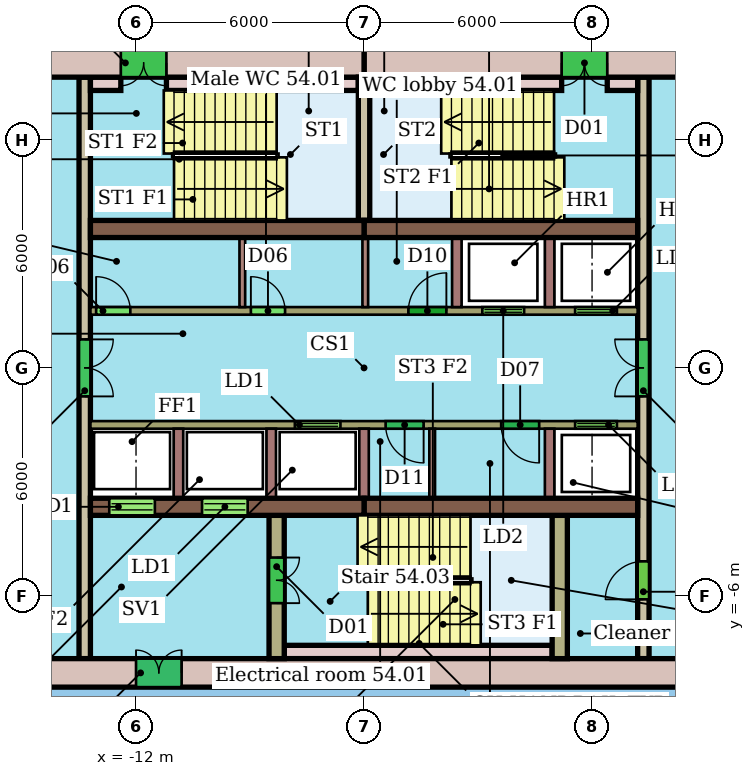
"""IFC4 building model, lengths in metres.
Left out: names, types, materials, properties, quantities, classifications, styles, units other than length and angle.
Written with IfcOpenShell. Run it as: python <this file> out.ifc"""

import sys

from ifc_helpers import new_model, si_unit, direction, frame, frame_2d, origin, place, context, subcontext, project, spatial, rectangle, extrude, element, fill, save


model = new_model("IFC4")
c1 = context("Model", 3, precision=1e-05, world=origin(), true_north=direction((0.0, 1.0)))
c2 = subcontext(c1, "Body", "Model", "MODEL_VIEW")
j1 = project(units=[si_unit("LENGTHUNIT", "METRE"), si_unit("PLANEANGLEUNIT", "RADIAN")], contexts=[c1])
p1 = place(None, origin())
s1 = spatial("IfcSite", under=j1, at=p1, CompositionType="ELEMENT")
p2 = place(p1, origin())
s2 = spatial("IfcBuilding", under=s1, at=p2, CompositionType="ELEMENT")
p3 = place(p2, frame((0.0, 0.0, 220.9)))
s3 = spatial("IfcBuildingStorey", under=s2, at=p3, CompositionType="ELEMENT", Elevation=220.9)
p4 = place(p3, frame((4.8, 8.025, 0.0), z_axis=(0.0, 0.0, 1.0), x_axis=(-1.0, 0.0, 0.0)))
e1 = element("IfcWall", 1, at=p4, inside=s3, PredefinedType="SHEAR", context=c2, shape_type="SweptSolid", body=[
    extrude(rectangle(XDim=10.8, YDim=0.75, at=frame_2d((5.4, 0.0))), origin(), (0.0, 0.0, 1.0), 3.3),
])
p5 = place(p4, frame((4.4, 0.0, 0.0)))
e2 = element("IfcOpeningElement", 2, at=p5, cuts=e1, PredefinedType="OPENING", context=c2, shape_type="SweptSolid", body=[
    extrude(rectangle(XDim=1.2, YDim=2.1, at=frame_2d((0.6, 1.05))), frame((0.0, 0.385, 0.0), z_axis=(0.0, -1.0, 0.0), x_axis=(1.0, 0.0, 0.0)), (0.0, 0.0, 1.0), 0.77),
])
p6 = place(p3, frame((-6.0, 8.025, 0.0), z_axis=(0.0, 0.0, 1.0), x_axis=(-1.0, 0.0, 0.0)))
e3 = element("IfcWall", 3, at=p6, inside=s3, PredefinedType="SHEAR", context=c2, shape_type="SweptSolid", body=[
    extrude(rectangle(XDim=10.8, YDim=0.75, at=frame_2d((5.4, 0.0))), origin(), (0.0, 0.0, 1.0), 3.3),
])
p7 = place(p6, frame((5.2, 0.0, 0.0)))
e4 = element("IfcOpeningElement", 4, at=p7, cuts=e3, PredefinedType="OPENING", context=c2, shape_type="SweptSolid", body=[
    extrude(rectangle(XDim=1.2, YDim=2.1, at=frame_2d((0.6, 1.05))), frame((0.0, 0.385, 0.0), z_axis=(0.0, -1.0, 0.0), x_axis=(1.0, 0.0, 0.0)), (0.0, 0.0, 1.0), 0.77),
])
p8 = place(p3, frame((-16.8, -8.025, 0.0), z_axis=(0.0, 0.0, 1.0), x_axis=(1.0, 0.0, 0.0)))
e5 = element("IfcWall", 5, at=p8, inside=s3, PredefinedType="SHEAR", context=c2, shape_type="SweptSolid", body=[
    extrude(rectangle(XDim=21.6, YDim=0.75, at=frame_2d((10.8, 0.0))), origin(), (0.0, 0.0, 1.0), 3.3),
])
p9 = place(p8, frame((4.8, 0.0, 0.0)))
e6 = element("IfcOpeningElement", 6, at=p9, cuts=e5, PredefinedType="OPENING", context=c2, shape_type="SweptSolid", body=[
    extrude(rectangle(XDim=1.2, YDim=2.1, at=frame_2d((0.6, 1.05))), frame((0.0, 0.385, 0.0), z_axis=(0.0, -1.0, 0.0), x_axis=(1.0, 0.0, 0.0)), (0.0, 0.0, 1.0), 0.77),
])
for number, where, z_axis, x_axis in (
    (7, (-13.2, 3.655, 0.0), (0.0, 0.0, 1.0), (1.0, 0.0, 0.0)),
    (8, (-6.0, 3.655, 0.0), (0.0, 0.0, 1.0), (1.0, 0.0, 0.0)),
):
    element("IfcWall", number, at=place(p3, frame(where, z_axis=z_axis, x_axis=x_axis)), inside=s3, PredefinedType="SHEAR", context=c2, shape_type="SweptSolid", body=[
        extrude(rectangle(XDim=7.2, YDim=0.45, at=frame_2d((3.6, 0.0))), origin(), (0.0, 0.0, 1.0), 3.3),
    ])
p10 = place(p3, frame((-13.2, -3.655, 0.0), z_axis=(0.0, 0.0, 1.0), x_axis=(1.0, 0.0, 0.0)))
e9 = element("IfcWall", 9, at=p10, inside=s3, PredefinedType="SHEAR", context=c2, shape_type="SweptSolid", body=[
    extrude(rectangle(XDim=7.2, YDim=0.45, at=frame_2d((3.6, 0.0))), origin(), (0.0, 0.0, 1.0), 3.3),
])
p11 = place(p10, frame((0.496, 0.0, 0.0)))
e10 = element("IfcOpeningElement", 10, at=p11, cuts=e9, PredefinedType="OPENING", context=c2, shape_type="SweptSolid", body=[
    extrude(rectangle(XDim=1.2, YDim=2.1, at=frame_2d((0.6, 1.05))), frame((0.0, 0.235, 0.0), z_axis=(0.0, -1.0, 0.0), x_axis=(1.0, 0.0, 0.0)), (0.0, 0.0, 1.0), 0.47),
])
p12 = place(p10, frame((2.938, 0.0, 0.0)))
e11 = element("IfcOpeningElement", 11, at=p12, cuts=e9, PredefinedType="OPENING", context=c2, shape_type="SweptSolid", body=[
    extrude(rectangle(XDim=1.2, YDim=2.1, at=frame_2d((0.6, 1.05))), frame((0.0, 0.235, 0.0), z_axis=(0.0, -1.0, 0.0), x_axis=(1.0, 0.0, 0.0)), (0.0, 0.0, 1.0), 0.47),
])
p13 = place(p3, frame((-6.0, -3.655, 0.0), z_axis=(0.0, 0.0, 1.0), x_axis=(1.0, 0.0, 0.0)))
e12 = element("IfcWall", 12, at=p13, inside=s3, PredefinedType="SHEAR", context=c2, shape_type="SweptSolid", body=[
    extrude(rectangle(XDim=7.2, YDim=0.45, at=frame_2d((3.6, 0.0))), origin(), (0.0, 0.0, 1.0), 3.3),
])
p14 = place(p3, frame((-13.35, 7.65, 0.0), z_axis=(0.0, 0.0, 1.0), x_axis=(0.0, -1.0, 0.0)))
e13 = element("IfcWall", 13, at=p14, inside=s3, PredefinedType="SHEAR", context=c2, shape_type="SweptSolid", body=[
    extrude(rectangle(XDim=15.3, YDim=0.3, at=frame_2d((7.65, 0.0))), origin(), (0.0, 0.0, 1.0), 3.3),
])
p15 = place(p14, frame((6.9, 0.0, 0.0)))
e14 = element("IfcOpeningElement", 14, at=p15, cuts=e13, PredefinedType="OPENING", context=c2, shape_type="SweptSolid", body=[
    extrude(rectangle(XDim=1.5, YDim=2.1, at=frame_2d((0.75, 1.05))), frame((0.0, 0.16, 0.0), z_axis=(0.0, -1.0, 0.0), x_axis=(1.0, 0.0, 0.0)), (0.0, 0.0, 1.0), 0.32),
])
p16 = place(p3, frame((1.35, -7.65, 0.0), z_axis=(0.0, 0.0, 1.0), x_axis=(0.0, 1.0, 0.0)))
e15 = element("IfcWall", 15, at=p16, inside=s3, PredefinedType="SHEAR", context=c2, shape_type="SweptSolid", body=[
    extrude(rectangle(XDim=15.3, YDim=0.3, at=frame_2d((7.65, 0.0))), origin(), (0.0, 0.0, 1.0), 3.3),
])
p17 = place(p16, frame((1.56, 0.0, 0.0)))
e16 = element("IfcOpeningElement", 16, at=p17, cuts=e15, PredefinedType="OPENING", context=c2, shape_type="SweptSolid", body=[
    extrude(rectangle(XDim=1.0, YDim=2.1, at=frame_2d((0.5, 1.05))), frame((0.0, 0.16, 0.0), z_axis=(0.0, -1.0, 0.0), x_axis=(1.0, 0.0, 0.0)), (0.0, 0.0, 1.0), 0.32),
])
p18 = place(p16, frame((6.9, 0.0, 0.0)))
e17 = element("IfcOpeningElement", 17, at=p18, cuts=e15, PredefinedType="OPENING", context=c2, shape_type="SweptSolid", body=[
    extrude(rectangle(XDim=1.5, YDim=2.1, at=frame_2d((0.75, 1.05))), frame((0.0, 0.16, 0.0), z_axis=(0.0, -1.0, 0.0), x_axis=(1.0, 0.0, 0.0)), (0.0, 0.0, 1.0), 0.32),
])
p19 = place(p3, frame((-13.2, 1.5, 0.0), z_axis=(0.0, 0.0, 1.0), x_axis=(1.0, 0.0, 0.0)))
e18 = element("IfcWall", 18, at=p19, inside=s3, PredefinedType="SHEAR", context=c2, shape_type="SweptSolid", body=[
    extrude(rectangle(XDim=14.4, YDim=0.2, at=frame_2d((7.2, 0.0))), origin(), (0.0, 0.0, 1.0), 3.3),
])
p20 = place(p19, frame((10.312, 0.0, 0.0)))
e19 = element("IfcOpeningElement", 19, at=p20, cuts=e18, PredefinedType="OPENING", context=c2, shape_type="SweptSolid", body=[
    extrude(rectangle(XDim=1.1, YDim=2.1, at=frame_2d((0.55, 1.05))), frame((0.0, 0.11, 0.0), z_axis=(0.0, -1.0, 0.0), x_axis=(1.0, 0.0, 0.0)), (0.0, 0.0, 1.0), 0.22),
])
p21 = place(p19, frame((12.754, 0.0, 0.0)))
e20 = element("IfcOpeningElement", 20, at=p21, cuts=e18, PredefinedType="OPENING", context=c2, shape_type="SweptSolid", body=[
    extrude(rectangle(XDim=1.1, YDim=2.1, at=frame_2d((0.55, 1.05))), frame((0.0, 0.11, 0.0), z_axis=(0.0, -1.0, 0.0), x_axis=(1.0, 0.0, 0.0)), (0.0, 0.0, 1.0), 0.22),
])
p22 = place(p19, frame((0.15, 0.0, 0.0)))
e21 = element("IfcOpeningElement", 21, at=p22, cuts=e18, PredefinedType="OPENING", context=c2, shape_type="SweptSolid", body=[
    extrude(rectangle(XDim=0.9, YDim=2.1, at=frame_2d((0.45, 1.05))), frame((0.0, 0.11, 0.0), z_axis=(0.0, -1.0, 0.0), x_axis=(1.0, 0.0, 0.0)), (0.0, 0.0, 1.0), 0.22),
])
p23 = place(p19, frame((4.222, 0.0, 0.0)))
e22 = element("IfcOpeningElement", 22, at=p23, cuts=e18, PredefinedType="OPENING", context=c2, shape_type="SweptSolid", body=[
    extrude(rectangle(XDim=0.9, YDim=2.1, at=frame_2d((0.45, 1.05))), frame((0.0, 0.11, 0.0), z_axis=(0.0, -1.0, 0.0), x_axis=(1.0, 0.0, 0.0)), (0.0, 0.0, 1.0), 0.22),
])
p24 = place(p19, frame((8.367, 0.0, 0.0)))
e23 = element("IfcOpeningElement", 23, at=p24, cuts=e18, PredefinedType="OPENING", context=c2, shape_type="SweptSolid", body=[
    extrude(rectangle(XDim=1.0, YDim=2.1, at=frame_2d((0.5, 1.05))), frame((0.0, 0.11, 0.0), z_axis=(0.0, -1.0, 0.0), x_axis=(1.0, 0.0, 0.0)), (0.0, 0.0, 1.0), 0.22),
])
p25 = place(p3, frame((1.2, -1.5, 0.0), z_axis=(0.0, 0.0, 1.0), x_axis=(-1.0, 0.0, 0.0)))
e24 = element("IfcWall", 24, at=p25, inside=s3, PredefinedType="SHEAR", context=c2, shape_type="SweptSolid", body=[
    extrude(rectangle(XDim=14.4, YDim=0.2, at=frame_2d((7.2, 0.0))), origin(), (0.0, 0.0, 1.0), 3.3),
])
p26 = place(p25, frame((7.821, 0.0, 0.0)))
e25 = element("IfcOpeningElement", 25, at=p26, cuts=e24, PredefinedType="OPENING", context=c2, shape_type="SweptSolid", body=[
    extrude(rectangle(XDim=1.2, YDim=2.1, at=frame_2d((0.6, 1.05))), frame((0.0, 0.11, 0.0), z_axis=(0.0, -1.0, 0.0), x_axis=(1.0, 0.0, 0.0)), (0.0, 0.0, 1.0), 0.22),
])
p27 = place(p25, frame((0.546, 0.0, 0.0)))
e26 = element("IfcOpeningElement", 26, at=p27, cuts=e24, PredefinedType="OPENING", context=c2, shape_type="SweptSolid", body=[
    extrude(rectangle(XDim=1.1, YDim=2.1, at=frame_2d((0.55, 1.05))), frame((0.0, 0.11, 0.0), z_axis=(0.0, -1.0, 0.0), x_axis=(1.0, 0.0, 0.0)), (0.0, 0.0, 1.0), 0.22),
])
p28 = place(p25, frame((5.632, 0.0, 0.0)))
e27 = element("IfcOpeningElement", 27, at=p28, cuts=e24, PredefinedType="OPENING", context=c2, shape_type="SweptSolid", body=[
    extrude(rectangle(XDim=1.0, YDim=2.1, at=frame_2d((0.5, 1.05))), frame((0.0, 0.11, 0.0), z_axis=(0.0, -1.0, 0.0), x_axis=(1.0, 0.0, 0.0)), (0.0, 0.0, 1.0), 0.22),
])
p29 = place(p25, frame((2.592, 0.0, 0.0)))
e28 = element("IfcOpeningElement", 28, at=p29, cuts=e24, PredefinedType="OPENING", context=c2, shape_type="SweptSolid", body=[
    extrude(rectangle(XDim=1.0, YDim=2.1, at=frame_2d((0.5, 1.05))), frame((0.0, 0.11, 0.0), z_axis=(0.0, -1.0, 0.0), x_axis=(1.0, 0.0, 0.0)), (0.0, 0.0, 1.0), 0.22),
])
p30 = place(p3, frame((-8.3, -3.88, 0.0), z_axis=(0.0, 0.0, 1.0), x_axis=(0.0, -1.0, 0.0)))
e29 = element("IfcWall", 29, at=p30, inside=s3, PredefinedType="SHEAR", context=c2, shape_type="SweptSolid", body=[
    extrude(rectangle(XDim=3.77, YDim=0.4, at=frame_2d((1.885, 0.0))), origin(), (0.0, 0.0, 1.0), 3.3),
])
p31 = place(p30, frame((1.11, 0.0, 0.0)))
e30 = element("IfcOpeningElement", 30, at=p31, cuts=e29, PredefinedType="OPENING", context=c2, shape_type="SweptSolid", body=[
    extrude(rectangle(XDim=1.2, YDim=2.1, at=frame_2d((0.6, 1.05))), frame((0.0, 0.21, 0.0), z_axis=(0.0, -1.0, 0.0), x_axis=(1.0, 0.0, 0.0)), (0.0, 0.0, 1.0), 0.42),
])
p32 = place(p3, frame((-0.85, -3.88, 0.0), z_axis=(0.0, 0.0, 1.0), x_axis=(0.0, -1.0, 0.0)))
e31 = element("IfcWall", 31, at=p32, inside=s3, PredefinedType="SHEAR", context=c2, shape_type="SweptSolid", body=[
    extrude(rectangle(XDim=3.77, YDim=0.4, at=frame_2d((1.885, 0.0))), origin(), (0.0, 0.0, 1.0), 3.3),
])
p33 = place(p3, frame((-6.0, 3.88, 0.0), z_axis=(0.0, 0.0, 1.0), x_axis=(0.0, 1.0, 0.0)))
e32 = element("IfcWall", 32, at=p33, inside=s3, PredefinedType="SHEAR", context=c2, shape_type="SweptSolid", body=[
    extrude(rectangle(XDim=3.77, YDim=0.3, at=frame_2d((1.885, 0.0))), origin(), (0.0, 0.0, 1.0), 3.3),
])
p34 = place(p3, frame((-13.2, 7.475, 0.0), z_axis=(0.0, 0.0, 1.0), x_axis=(1.0, 0.0, 0.0)))
e33 = element("IfcWall", 33, at=p34, inside=s3, PredefinedType="SHEAR", context=c2, shape_type="SweptSolid", body=[
    extrude(rectangle(XDim=0.8, YDim=0.35, at=frame_2d((0.4, 0.0))), origin(), (0.0, 0.0, 1.0), 3.3),
])
for number, where, z_axis, x_axis in (
    (34, (-11.2, 7.475, 0.0), (0.0, 0.0, 1.0), (1.0, 0.0, 0.0)),
    (35, (-5.85, 7.475, 0.0), (0.0, 0.0, 1.0), (1.0, 0.0, 0.0)),
):
    element("IfcWall", number, at=place(p3, frame(where, z_axis=z_axis, x_axis=x_axis)), inside=s3, PredefinedType="SHEAR", context=c2, shape_type="SweptSolid", body=[
        extrude(rectangle(XDim=5.05, YDim=0.35, at=frame_2d((2.525, 0.0))), origin(), (0.0, 0.0, 1.0), 3.3),
    ])
p35 = place(p3, frame((0.4, 7.475, 0.0), z_axis=(0.0, 0.0, 1.0), x_axis=(1.0, 0.0, 0.0)))
e36 = element("IfcWall", 36, at=p35, inside=s3, PredefinedType="SHEAR", context=c2, shape_type="SweptSolid", body=[
    extrude(rectangle(XDim=0.8, YDim=0.35, at=frame_2d((0.4, 0.0))), origin(), (0.0, 0.0, 1.0), 3.3),
])
p36 = place(p3, frame((-8.1, -7.475, 0.0), z_axis=(0.0, 0.0, 1.0), x_axis=(1.0, 0.0, 0.0)))
e37 = element("IfcWall", 37, at=p36, inside=s3, PredefinedType="SHEAR", context=c2, shape_type="SweptSolid", body=[
    extrude(rectangle(XDim=7.05, YDim=0.35, at=frame_2d((3.525, 0.0))), origin(), (0.0, 0.0, 1.0), 3.3),
])
for number, where, z_axis, x_axis in (
    (38, (-3.558, 1.6, 0.0), (0.0, 0.0, 1.0), (0.0, 1.0, 0.0)),
    (39, (-1.117, 1.6, 0.0), (0.0, 0.0, 1.0), (0.0, 1.0, 0.0)),
):
    element("IfcWall", number, at=place(p3, frame(where, z_axis=z_axis, x_axis=x_axis)), inside=s3, PredefinedType="SHEAR", context=c2, shape_type="SweptSolid", body=[
        extrude(rectangle(XDim=1.83, YDim=0.25, at=frame_2d((0.915, 0.0))), origin(), (0.0, 0.0, 1.0), 3.3),
    ])
for number, where, z_axis, x_axis in (
    (40, (-9.203, 1.6, 0.0), (0.0, 0.0, 1.0), (0.0, 1.0, 0.0)),
    (41, (-5.967, 1.6, 0.0), (0.0, 0.0, 1.0), (0.0, 1.0, 0.0)),
):
    element("IfcWall", number, at=place(p3, frame(where, z_axis=z_axis, x_axis=x_axis)), inside=s3, PredefinedType="PARTITIONING", context=c2, shape_type="SweptSolid", body=[
        extrude(rectangle(XDim=1.83, YDim=0.15, at=frame_2d((0.915, 0.0))), origin(), (0.0, 0.0, 1.0), 3.3),
    ])
for number, where, z_axis, x_axis in (
    (42, (-10.883, -1.6, 0.0), (0.0, 0.0, 1.0), (0.0, -1.0, 0.0)),
    (43, (-8.442, -1.6, 0.0), (0.0, 0.0, 1.0), (0.0, -1.0, 0.0)),
    (44, (-6.0, -1.6, 0.0), (0.0, 0.0, 1.0), (0.0, -1.0, 0.0)),
    (45, (-1.117, -1.6, 0.0), (0.0, 0.0, 1.0), (0.0, -1.0, 0.0)),
):
    element("IfcWall", number, at=place(p3, frame(where, z_axis=z_axis, x_axis=x_axis)), inside=s3, PredefinedType="SHEAR", context=c2, shape_type="SweptSolid", body=[
        extrude(rectangle(XDim=1.83, YDim=0.25, at=frame_2d((0.915, 0.0))), origin(), (0.0, 0.0, 1.0), 3.3),
    ])
p37 = place(p3, frame((-4.207, -1.6, 0.0), z_axis=(0.0, 0.0, 1.0), x_axis=(0.0, -1.0, 0.0)))
e46 = element("IfcWall", 46, at=p37, inside=s3, PredefinedType="PARTITIONING", context=c2, shape_type="SweptSolid", body=[
    extrude(rectangle(XDim=1.83, YDim=0.15, at=frame_2d((0.915, 0.0))), origin(), (0.0, 0.0, 1.0), 3.3),
])
p38 = place(p5, origin())
e47 = element("IfcDoor", 47, at=p38, inside=s3, OperationType="DOUBLE_DOOR_SINGLE_SWING", PredefinedType="NOTDEFINED", context=c2, shape_type="SweptSolid", body=[
    extrude(rectangle(XDim=1.2, YDim=2.1, at=frame_2d((0.6, 1.05))), frame((0.0, 0.025, 0.0), z_axis=(0.0, -1.0, 0.0), x_axis=(1.0, 0.0, 0.0)), (0.0, 0.0, 1.0), 0.05),
])
fill(e2, e47)
p39 = place(p7, origin())
e48 = element("IfcDoor", 48, at=p39, inside=s3, OperationType="DOUBLE_DOOR_SINGLE_SWING", PredefinedType="NOTDEFINED", context=c2, shape_type="SweptSolid", body=[
    extrude(rectangle(XDim=1.2, YDim=2.1, at=frame_2d((0.6, 1.05))), frame((0.0, 0.025, 0.0), z_axis=(0.0, -1.0, 0.0), x_axis=(1.0, 0.0, 0.0)), (0.0, 0.0, 1.0), 0.05),
])
fill(e4, e48)
p40 = place(p9, origin())
e49 = element("IfcDoor", 49, at=p40, inside=s3, OperationType="DOUBLE_DOOR_SINGLE_SWING", PredefinedType="NOTDEFINED", context=c2, shape_type="SweptSolid", body=[
    extrude(rectangle(XDim=1.2, YDim=2.1, at=frame_2d((0.6, 1.05))), frame((0.0, 0.025, 0.0), z_axis=(0.0, -1.0, 0.0), x_axis=(1.0, 0.0, 0.0)), (0.0, 0.0, 1.0), 0.05),
])
fill(e6, e49)
p41 = place(p11, origin())
e50 = element("IfcDoor", 50, at=p41, inside=s3, OperationType="DOUBLE_DOOR_SLIDING", PredefinedType="NOTDEFINED", context=c2, shape_type="SweptSolid", body=[
    extrude(rectangle(XDim=1.2, YDim=2.1, at=frame_2d((0.6, 1.05))), frame((0.0, 0.025, 0.0), z_axis=(0.0, -1.0, 0.0), x_axis=(1.0, 0.0, 0.0)), (0.0, 0.0, 1.0), 0.05),
])
fill(e10, e50)
p42 = place(p12, origin())
e51 = element("IfcDoor", 51, at=p42, inside=s3, OperationType="DOUBLE_DOOR_SLIDING", PredefinedType="NOTDEFINED", context=c2, shape_type="SweptSolid", body=[
    extrude(rectangle(XDim=1.2, YDim=2.1, at=frame_2d((0.6, 1.05))), frame((0.0, 0.025, 0.0), z_axis=(0.0, -1.0, 0.0), x_axis=(1.0, 0.0, 0.0)), (0.0, 0.0, 1.0), 0.05),
])
fill(e11, e51)
p43 = place(p15, origin())
e52 = element("IfcDoor", 52, at=p43, inside=s3, OperationType="DOUBLE_DOOR_SINGLE_SWING", PredefinedType="NOTDEFINED", context=c2, shape_type="SweptSolid", body=[
    extrude(rectangle(XDim=1.5, YDim=2.1, at=frame_2d((0.75, 1.05))), frame((0.0, 0.025, 0.0), z_axis=(0.0, -1.0, 0.0), x_axis=(1.0, 0.0, 0.0)), (0.0, 0.0, 1.0), 0.05),
])
fill(e14, e52)
p44 = place(p17, origin())
e53 = element("IfcDoor", 53, at=p44, inside=s3, OperationType="SINGLE_SWING_LEFT", PredefinedType="NOTDEFINED", context=c2, shape_type="SweptSolid", body=[
    extrude(rectangle(XDim=1.0, YDim=2.1, at=frame_2d((0.5, 1.05))), frame((0.0, 0.025, 0.0), z_axis=(0.0, -1.0, 0.0), x_axis=(1.0, 0.0, 0.0)), (0.0, 0.0, 1.0), 0.05),
])
fill(e16, e53)
p45 = place(p18, origin())
e54 = element("IfcDoor", 54, at=p45, inside=s3, OperationType="DOUBLE_DOOR_SINGLE_SWING", PredefinedType="NOTDEFINED", context=c2, shape_type="SweptSolid", body=[
    extrude(rectangle(XDim=1.5, YDim=2.1, at=frame_2d((0.75, 1.05))), frame((0.0, 0.025, 0.0), z_axis=(0.0, -1.0, 0.0), x_axis=(1.0, 0.0, 0.0)), (0.0, 0.0, 1.0), 0.05),
])
fill(e17, e54)
p46 = place(p20, origin())
e55 = element("IfcDoor", 55, at=p46, inside=s3, OperationType="DOUBLE_DOOR_SLIDING", PredefinedType="NOTDEFINED", context=c2, shape_type="SweptSolid", body=[
    extrude(rectangle(XDim=1.1, YDim=2.1, at=frame_2d((0.55, 1.05))), frame((0.0, 0.025, 0.0), z_axis=(0.0, -1.0, 0.0), x_axis=(1.0, 0.0, 0.0)), (0.0, 0.0, 1.0), 0.05),
])
fill(e19, e55)
p47 = place(p21, origin())
e56 = element("IfcDoor", 56, at=p47, inside=s3, OperationType="DOUBLE_DOOR_SLIDING", PredefinedType="NOTDEFINED", context=c2, shape_type="SweptSolid", body=[
    extrude(rectangle(XDim=1.1, YDim=2.1, at=frame_2d((0.55, 1.05))), frame((0.0, 0.025, 0.0), z_axis=(0.0, -1.0, 0.0), x_axis=(1.0, 0.0, 0.0)), (0.0, 0.0, 1.0), 0.05),
])
fill(e20, e56)
p48 = place(p22, origin())
e57 = element("IfcDoor", 57, at=p48, inside=s3, OperationType="SINGLE_SWING_LEFT", PredefinedType="NOTDEFINED", context=c2, shape_type="SweptSolid", body=[
    extrude(rectangle(XDim=0.9, YDim=2.1, at=frame_2d((0.45, 1.05))), frame((0.0, 0.025, 0.0), z_axis=(0.0, -1.0, 0.0), x_axis=(1.0, 0.0, 0.0)), (0.0, 0.0, 1.0), 0.05),
])
fill(e21, e57)
p49 = place(p23, origin())
e58 = element("IfcDoor", 58, at=p49, inside=s3, OperationType="SINGLE_SWING_LEFT", PredefinedType="NOTDEFINED", context=c2, shape_type="SweptSolid", body=[
    extrude(rectangle(XDim=0.9, YDim=2.1, at=frame_2d((0.45, 1.05))), frame((0.0, 0.025, 0.0), z_axis=(0.0, -1.0, 0.0), x_axis=(1.0, 0.0, 0.0)), (0.0, 0.0, 1.0), 0.05),
])
fill(e22, e58)
p50 = place(p24, origin())
e59 = element("IfcDoor", 59, at=p50, inside=s3, OperationType="SINGLE_SWING_RIGHT", PredefinedType="NOTDEFINED", context=c2, shape_type="SweptSolid", body=[
    extrude(rectangle(XDim=1.0, YDim=2.1, at=frame_2d((0.5, 1.05))), frame((0.0, 0.025, 0.0), z_axis=(0.0, -1.0, 0.0), x_axis=(1.0, 0.0, 0.0)), (0.0, 0.0, 1.0), 0.05),
])
fill(e23, e59)
p51 = place(p26, origin())
e60 = element("IfcDoor", 60, at=p51, inside=s3, OperationType="DOUBLE_DOOR_SLIDING", PredefinedType="NOTDEFINED", context=c2, shape_type="SweptSolid", body=[
    extrude(rectangle(XDim=1.2, YDim=2.1, at=frame_2d((0.6, 1.05))), frame((0.0, 0.025, 0.0), z_axis=(0.0, -1.0, 0.0), x_axis=(1.0, 0.0, 0.0)), (0.0, 0.0, 1.0), 0.05),
])
fill(e25, e60)
p52 = place(p27, origin())
e61 = element("IfcDoor", 61, at=p52, inside=s3, OperationType="DOUBLE_DOOR_SLIDING", PredefinedType="NOTDEFINED", context=c2, shape_type="SweptSolid", body=[
    extrude(rectangle(XDim=1.1, YDim=2.1, at=frame_2d((0.55, 1.05))), frame((0.0, 0.025, 0.0), z_axis=(0.0, -1.0, 0.0), x_axis=(1.0, 0.0, 0.0)), (0.0, 0.0, 1.0), 0.05),
])
fill(e26, e61)
p53 = place(p28, origin())
e62 = element("IfcDoor", 62, at=p53, inside=s3, OperationType="SINGLE_SWING_LEFT", PredefinedType="NOTDEFINED", context=c2, shape_type="SweptSolid", body=[
    extrude(rectangle(XDim=1.0, YDim=2.1, at=frame_2d((0.5, 1.05))), frame((0.0, 0.025, 0.0), z_axis=(0.0, -1.0, 0.0), x_axis=(1.0, 0.0, 0.0)), (0.0, 0.0, 1.0), 0.05),
])
fill(e27, e62)
p54 = place(p29, origin())
e63 = element("IfcDoor", 63, at=p54, inside=s3, OperationType="SINGLE_SWING_LEFT", PredefinedType="NOTDEFINED", context=c2, shape_type="SweptSolid", body=[
    extrude(rectangle(XDim=1.0, YDim=2.1, at=frame_2d((0.5, 1.05))), frame((0.0, 0.025, 0.0), z_axis=(0.0, -1.0, 0.0), x_axis=(1.0, 0.0, 0.0)), (0.0, 0.0, 1.0), 0.05),
])
fill(e28, e63)
p55 = place(p31, origin())
e64 = element("IfcDoor", 64, at=p55, inside=s3, OperationType="DOUBLE_DOOR_SINGLE_SWING", PredefinedType="NOTDEFINED", context=c2, shape_type="SweptSolid", body=[
    extrude(rectangle(XDim=1.2, YDim=2.1, at=frame_2d((0.6, 1.05))), frame((0.0, 0.025, 0.0), z_axis=(0.0, -1.0, 0.0), x_axis=(1.0, 0.0, 0.0)), (0.0, 0.0, 1.0), 0.05),
])
fill(e30, e64)
save(model, sys.argv[1])
